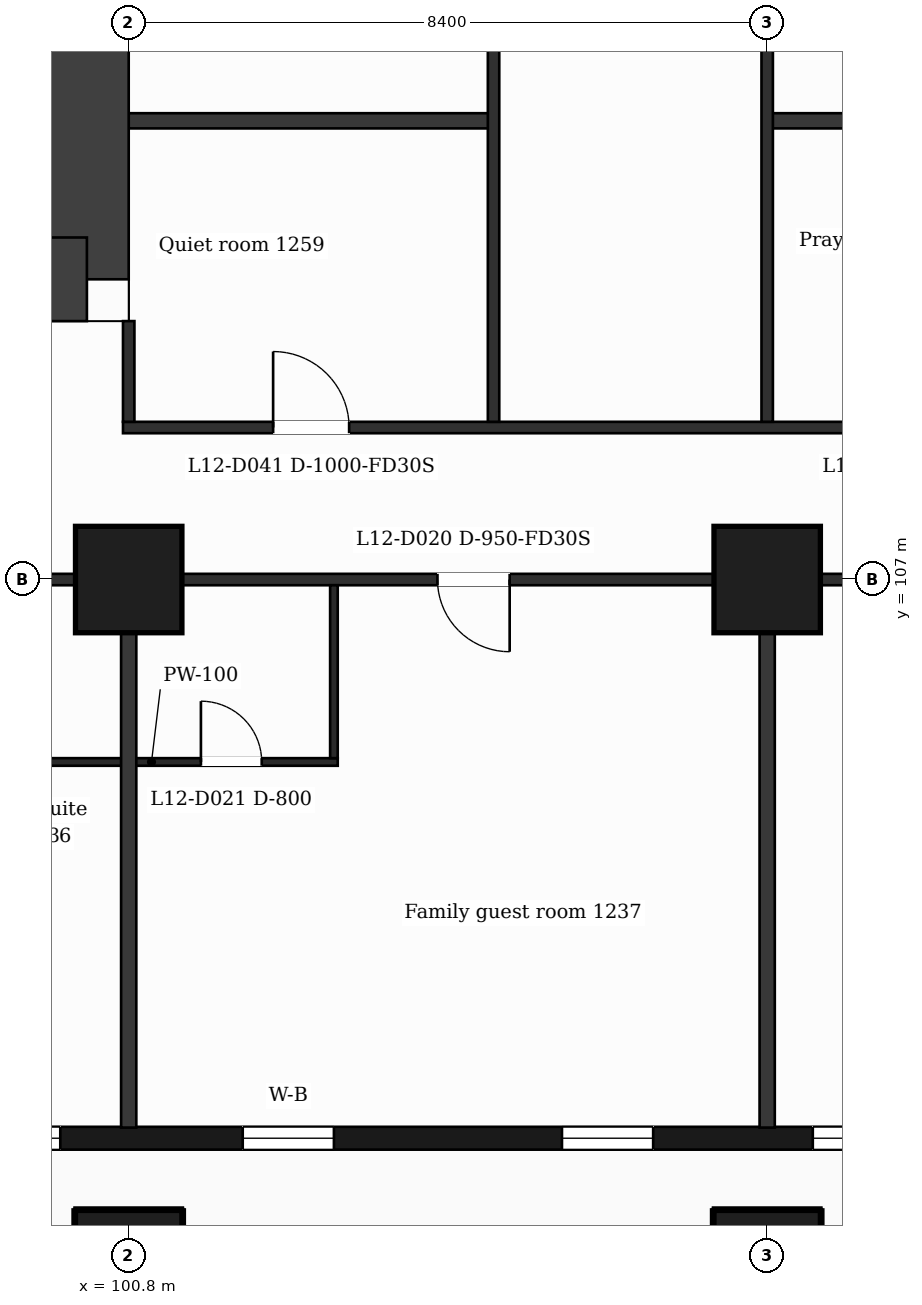
"""IFC4 building model, lengths in metres.
Left out: names, types, materials, properties, quantities, classifications, styles, units other than length and angle.
Written with IfcOpenShell. Run it as: python <this file> out.ifc"""

import sys

from ifc_helpers import new_model, si_unit, direction, frame, frame_2d, origin, origin_2d, place, context, subcontext, project, spatial, rectangle, extrude, element, fill, save


model = new_model("IFC4")
c1 = context("Model", 3, precision=1e-05, world=origin(), true_north=direction((0.0, 1.0)))
c2 = subcontext(c1, "Body", "Model", "MODEL_VIEW")
j1 = project(units=[si_unit("LENGTHUNIT", "METRE"), si_unit("PLANEANGLEUNIT", "RADIAN")], contexts=[c1])
p1 = place(None, origin())
s1 = spatial("IfcSite", under=j1, at=p1, CompositionType="ELEMENT")
p2 = place(p1, origin())
s2 = spatial("IfcBuilding", under=s1, at=p2, CompositionType="ELEMENT")
p3 = place(p2, frame((0.0, 0.0, 60.0)))
s3 = spatial("IfcBuildingStorey", under=s2, at=p3, CompositionType="ELEMENT", Elevation=60.0)
p4 = place(p3, frame((100.25, 131.85, 0.0), z_axis=(0.0, 0.0, 1.0), x_axis=(0.0, -1.0, 0.0)))
e1 = element("IfcWall", 1, at=p4, inside=s3, PredefinedType="SHEAR", context=c2, shape_type="SweptSolid", body=[
    extrude(rectangle(XDim=20.9, YDim=1.1, at=frame_2d((10.45, 0.0))), origin(), (0.0, 0.0, 1.0), 3.5),
])
p5 = place(p4, frame((7.7, 0.0, 0.0)))
e2 = element("IfcOpeningElement", 2, at=p5, cuts=e1, PredefinedType="OPENING", context=c2, shape_type="SweptSolid", body=[
    extrude(rectangle(XDim=1.4, YDim=2.1, at=frame_2d((0.7, 1.05))), frame((0.0, 0.56, 0.0), z_axis=(0.0, -1.0, 0.0), x_axis=(1.0, 0.0, 0.0)), (0.0, 0.0, 1.0), 1.12),
])
p6 = place(p3, frame((100.25, 110.95, 0.0), z_axis=(0.0, 0.0, 1.0), x_axis=(-1.0, 0.0, 0.0)))
e3 = element("IfcWall", 3, at=p6, inside=s3, PredefinedType="SHEAR", context=c2, shape_type="SweptSolid", body=[
    extrude(rectangle(XDim=13.952, YDim=1.1, at=frame_2d((6.976, 0.0))), origin(), (0.0, 0.0, 1.0), 3.5),
])
p7 = place(p6, frame((5.748, 0.0, 0.0)))
e4 = element("IfcOpeningElement", 4, at=p7, cuts=e3, PredefinedType="OPENING", context=c2, shape_type="SweptSolid", body=[
    extrude(rectangle(XDim=1.4, YDim=2.1, at=frame_2d((0.7, 1.05))), frame((0.0, 0.56, 0.0), z_axis=(0.0, -1.0, 0.0), x_axis=(1.0, 0.0, 0.0)), (0.0, 0.0, 1.0), 1.12),
])
for number, where, z_axis, x_axis in (
    (5, (100.8, 98.0, 0.0), (0.0, 0.0, 1.0), (1.0, 0.0, 0.0)),
    (6, (109.2, 98.0, 0.0), (0.0, 0.0, 1.0), (1.0, 0.0, 0.0)),
    (7, (100.8, 107.0, 0.0), (0.0, 0.0, 1.0), (1.0, 0.0, 0.0)),
    (8, (109.2, 107.0, 0.0), (0.0, 0.0, 1.0), (1.0, 0.0, 0.0)),
):
    element("IfcColumn", number, at=place(p3, frame(where, z_axis=z_axis, x_axis=x_axis)), inside=s3, PredefinedType="COLUMN", context=c2, shape_type="SweptSolid", body=[
        extrude(rectangle(XDim=1.4, YDim=1.4, at=origin_2d()), origin(), (0.0, 0.0, 1.0), 3.5),
    ])
p8 = place(p3, frame((89.85, 99.65, 0.0), z_axis=(0.0, 0.0, 1.0), x_axis=(1.0, 0.0, 0.0)))
e9 = element("IfcWall", 9, at=p8, inside=s3, PredefinedType="SOLIDWALL", context=c2, shape_type="SweptSolid", body=[
    extrude(rectangle(XDim=47.25, YDim=0.3, at=frame_2d((23.625, 0.0))), origin(), (0.0, 0.0, 1.0), 3.18),
])
p9 = place(p8, frame((0.725, 0.0, 0.9)))
e10 = element("IfcOpeningElement", 10, at=p9, cuts=e9, PredefinedType="OPENING", context=c2, shape_type="SweptSolid", body=[
    extrude(rectangle(XDim=1.2, YDim=2.1, at=frame_2d((0.6, 1.05))), frame((0.0, 0.16, 0.0), z_axis=(0.0, -1.0, 0.0), x_axis=(1.0, 0.0, 0.0)), (0.0, 0.0, 1.0), 0.32),
])
p10 = place(p8, frame((3.45, 0.0, 0.9)))
e11 = element("IfcOpeningElement", 11, at=p10, cuts=e9, PredefinedType="OPENING", context=c2, shape_type="SweptSolid", body=[
    extrude(rectangle(XDim=2.4, YDim=2.1, at=frame_2d((1.2, 1.05))), frame((0.0, 0.16, 0.0), z_axis=(0.0, -1.0, 0.0), x_axis=(1.0, 0.0, 0.0)), (0.0, 0.0, 1.0), 0.32),
])
p11 = place(p8, frame((7.65, 0.0, 0.9)))
e12 = element("IfcOpeningElement", 12, at=p11, cuts=e9, PredefinedType="OPENING", context=c2, shape_type="SweptSolid", body=[
    extrude(rectangle(XDim=2.4, YDim=2.1, at=frame_2d((1.2, 1.05))), frame((0.0, 0.16, 0.0), z_axis=(0.0, -1.0, 0.0), x_axis=(1.0, 0.0, 0.0)), (0.0, 0.0, 1.0), 0.32),
])
p12 = place(p8, frame((12.45, 0.0, 0.9)))
e13 = element("IfcOpeningElement", 13, at=p12, cuts=e9, PredefinedType="OPENING", context=c2, shape_type="SweptSolid", body=[
    extrude(rectangle(XDim=1.2, YDim=2.1, at=frame_2d((0.6, 1.05))), frame((0.0, 0.16, 0.0), z_axis=(0.0, -1.0, 0.0), x_axis=(1.0, 0.0, 0.0)), (0.0, 0.0, 1.0), 0.32),
])
p13 = place(p8, frame((16.65, 0.0, 0.9)))
e14 = element("IfcOpeningElement", 14, at=p13, cuts=e9, PredefinedType="OPENING", context=c2, shape_type="SweptSolid", body=[
    extrude(rectangle(XDim=1.2, YDim=2.1, at=frame_2d((0.6, 1.05))), frame((0.0, 0.16, 0.0), z_axis=(0.0, -1.0, 0.0), x_axis=(1.0, 0.0, 0.0)), (0.0, 0.0, 1.0), 0.32),
])
p14 = place(p8, frame((19.95, 0.0, 0.9)))
e15 = element("IfcOpeningElement", 15, at=p14, cuts=e9, PredefinedType="OPENING", context=c2, shape_type="SweptSolid", body=[
    extrude(rectangle(XDim=1.2, YDim=2.1, at=frame_2d((0.6, 1.05))), frame((0.0, 0.16, 0.0), z_axis=(0.0, -1.0, 0.0), x_axis=(1.0, 0.0, 0.0)), (0.0, 0.0, 1.0), 0.32),
])
p15 = place(p8, frame((21.75, 0.0, 0.9)))
e16 = element("IfcOpeningElement", 16, at=p15, cuts=e9, PredefinedType="OPENING", context=c2, shape_type="SweptSolid", body=[
    extrude(rectangle(XDim=1.2, YDim=2.1, at=frame_2d((0.6, 1.05))), frame((0.0, 0.16, 0.0), z_axis=(0.0, -1.0, 0.0), x_axis=(1.0, 0.0, 0.0)), (0.0, 0.0, 1.0), 0.32),
])
p16 = place(p8, frame((25.05, 0.0, 0.0)))
e17 = element("IfcOpeningElement", 17, at=p16, cuts=e9, PredefinedType="OPENING", context=c2, shape_type="SweptSolid", body=[
    extrude(rectangle(XDim=1.2, YDim=2.4, at=frame_2d((0.6, 1.2))), frame((0.0, 0.16, 0.0), z_axis=(0.0, -1.0, 0.0), x_axis=(1.0, 0.0, 0.0)), (0.0, 0.0, 1.0), 0.32),
])
p17 = place(p8, frame((28.35, 0.0, 0.9)))
e18 = element("IfcOpeningElement", 18, at=p17, cuts=e9, PredefinedType="OPENING", context=c2, shape_type="SweptSolid", body=[
    extrude(rectangle(XDim=1.2, YDim=2.1, at=frame_2d((0.6, 1.05))), frame((0.0, 0.16, 0.0), z_axis=(0.0, -1.0, 0.0), x_axis=(1.0, 0.0, 0.0)), (0.0, 0.0, 1.0), 0.32),
])
p18 = place(p8, frame((30.15, 0.0, 0.9)))
e19 = element("IfcOpeningElement", 19, at=p18, cuts=e9, PredefinedType="OPENING", context=c2, shape_type="SweptSolid", body=[
    extrude(rectangle(XDim=1.2, YDim=2.1, at=frame_2d((0.6, 1.05))), frame((0.0, 0.16, 0.0), z_axis=(0.0, -1.0, 0.0), x_axis=(1.0, 0.0, 0.0)), (0.0, 0.0, 1.0), 0.32),
])
p19 = place(p8, frame((32.85, 0.0, 0.9)))
e20 = element("IfcOpeningElement", 20, at=p19, cuts=e9, PredefinedType="OPENING", context=c2, shape_type="SweptSolid", body=[
    extrude(rectangle(XDim=2.4, YDim=2.1, at=frame_2d((1.2, 1.05))), frame((0.0, 0.16, 0.0), z_axis=(0.0, -1.0, 0.0), x_axis=(1.0, 0.0, 0.0)), (0.0, 0.0, 1.0), 0.32),
])
p20 = place(p8, frame((37.05, 0.0, 0.9)))
e21 = element("IfcOpeningElement", 21, at=p20, cuts=e9, PredefinedType="OPENING", context=c2, shape_type="SweptSolid", body=[
    extrude(rectangle(XDim=2.4, YDim=2.1, at=frame_2d((1.2, 1.05))), frame((0.0, 0.16, 0.0), z_axis=(0.0, -1.0, 0.0), x_axis=(1.0, 0.0, 0.0)), (0.0, 0.0, 1.0), 0.32),
])
p21 = place(p8, frame((41.85, 0.0, 0.9)))
e22 = element("IfcOpeningElement", 22, at=p21, cuts=e9, PredefinedType="OPENING", context=c2, shape_type="SweptSolid", body=[
    extrude(rectangle(XDim=1.2, YDim=2.1, at=frame_2d((0.6, 1.05))), frame((0.0, 0.16, 0.0), z_axis=(0.0, -1.0, 0.0), x_axis=(1.0, 0.0, 0.0)), (0.0, 0.0, 1.0), 0.32),
])
p22 = place(p8, frame((45.25, 0.0, 0.9)))
e23 = element("IfcOpeningElement", 23, at=p22, cuts=e9, PredefinedType="OPENING", context=c2, shape_type="SweptSolid", body=[
    extrude(rectangle(XDim=1.2, YDim=2.1, at=frame_2d((0.6, 1.05))), frame((0.0, 0.16, 0.0), z_axis=(0.0, -1.0, 0.0), x_axis=(1.0, 0.0, 0.0)), (0.0, 0.0, 1.0), 0.32),
])
p23 = place(p3, frame((98.65, 104.6, 0.0), z_axis=(0.0, 0.0, 1.0), x_axis=(1.0, 0.0, 0.0)))
e24 = element("IfcWall", 24, at=p23, inside=s3, PredefinedType="PARTITIONING", context=c2, shape_type="SweptSolid", body=[
    extrude(rectangle(XDim=4.9, YDim=0.1, at=frame_2d((2.45, 0.0))), origin(), (0.0, 0.0, 1.0), 3.18),
])
p24 = place(p23, frame((3.1, 0.0, 0.0)))
e25 = element("IfcOpeningElement", 25, at=p24, cuts=e24, PredefinedType="OPENING", context=c2, shape_type="SweptSolid", body=[
    extrude(rectangle(XDim=0.8, YDim=2.1, at=frame_2d((0.4, 1.05))), frame((0.0, 0.06, 0.0), z_axis=(0.0, -1.0, 0.0), x_axis=(1.0, 0.0, 0.0)), (0.0, 0.0, 1.0), 0.12),
])
p25 = place(p3, frame((87.018, 107.0, 0.0), z_axis=(0.0, 0.0, 1.0), x_axis=(1.0, 0.0, 0.0)))
e26 = element("IfcWall", 26, at=p25, inside=s3, PredefinedType="PARTITIONING", context=c2, shape_type="SweptSolid", body=[
    extrude(rectangle(XDim=52.765, YDim=0.15, at=frame_2d((26.382, 0.0))), origin(), (0.0, 0.0, 1.0), 3.18),
])
p26 = place(p25, frame((1.032, 0.0, 0.0)))
e27 = element("IfcOpeningElement", 27, at=p26, cuts=e26, PredefinedType="OPENING", context=c2, shape_type="SweptSolid", body=[
    extrude(rectangle(XDim=0.95, YDim=2.1, at=frame_2d((0.475, 1.05))), frame((0.0, 0.085, 0.0), z_axis=(0.0, -1.0, 0.0), x_axis=(1.0, 0.0, 0.0)), (0.0, 0.0, 1.0), 0.17),
])
p27 = place(p25, frame((6.894, 0.0, 0.0)))
e28 = element("IfcOpeningElement", 28, at=p27, cuts=e26, PredefinedType="OPENING", context=c2, shape_type="SweptSolid", body=[
    extrude(rectangle(XDim=0.95, YDim=2.1, at=frame_2d((0.475, 1.05))), frame((0.0, 0.085, 0.0), z_axis=(0.0, -1.0, 0.0), x_axis=(1.0, 0.0, 0.0)), (0.0, 0.0, 1.0), 0.17),
])
p28 = place(p25, frame((17.844, 0.0, 0.0)))
e29 = element("IfcOpeningElement", 29, at=p28, cuts=e26, PredefinedType="OPENING", context=c2, shape_type="SweptSolid", body=[
    extrude(rectangle(XDim=0.95, YDim=2.1, at=frame_2d((0.475, 1.05))), frame((0.0, 0.085, 0.0), z_axis=(0.0, -1.0, 0.0), x_axis=(1.0, 0.0, 0.0)), (0.0, 0.0, 1.0), 0.17),
])
p29 = place(p25, frame((26.245, 0.0, 0.0)))
e30 = element("IfcOpeningElement", 30, at=p29, cuts=e26, PredefinedType="OPENING", context=c2, shape_type="SweptSolid", body=[
    extrude(rectangle(XDim=0.95, YDim=2.1, at=frame_2d((0.475, 1.05))), frame((0.0, 0.085, 0.0), z_axis=(0.0, -1.0, 0.0), x_axis=(1.0, 0.0, 0.0)), (0.0, 0.0, 1.0), 0.17),
])
p30 = place(p25, frame((35.822, 0.0, 0.0)))
e31 = element("IfcOpeningElement", 31, at=p30, cuts=e26, PredefinedType="OPENING", context=c2, shape_type="SweptSolid", body=[
    extrude(rectangle(XDim=0.95, YDim=2.1, at=frame_2d((0.475, 1.05))), frame((0.0, 0.085, 0.0), z_axis=(0.0, -1.0, 0.0), x_axis=(1.0, 0.0, 0.0)), (0.0, 0.0, 1.0), 0.17),
])
p31 = place(p25, frame((42.302, 0.0, 0.0)))
e32 = element("IfcOpeningElement", 32, at=p31, cuts=e26, PredefinedType="OPENING", context=c2, shape_type="SweptSolid", body=[
    extrude(rectangle(XDim=0.95, YDim=2.1, at=frame_2d((0.475, 1.05))), frame((0.0, 0.085, 0.0), z_axis=(0.0, -1.0, 0.0), x_axis=(1.0, 0.0, 0.0)), (0.0, 0.0, 1.0), 0.17),
])
p32 = place(p25, frame((49.285, 0.0, 0.0)))
e33 = element("IfcOpeningElement", 33, at=p32, cuts=e26, PredefinedType="OPENING", context=c2, shape_type="SweptSolid", body=[
    extrude(rectangle(XDim=0.95, YDim=2.1, at=frame_2d((0.475, 1.05))), frame((0.0, 0.085, 0.0), z_axis=(0.0, -1.0, 0.0), x_axis=(1.0, 0.0, 0.0)), (0.0, 0.0, 1.0), 0.17),
])
p33 = place(p3, frame((100.725, 109.0, 0.0), z_axis=(0.0, 0.0, 1.0), x_axis=(1.0, 0.0, 0.0)))
e34 = element("IfcWall", 34, at=p33, inside=s3, PredefinedType="PARTITIONING", context=c2, shape_type="SweptSolid", body=[
    extrude(rectangle(XDim=25.35, YDim=0.15, at=frame_2d((12.675, 0.0))), origin(), (0.0, 0.0, 1.0), 3.18),
])
p34 = place(p33, frame((1.975, 0.0, 0.0)))
e35 = element("IfcOpeningElement", 35, at=p34, cuts=e34, PredefinedType="OPENING", context=c2, shape_type="SweptSolid", body=[
    extrude(rectangle(XDim=1.0, YDim=2.1, at=frame_2d((0.5, 1.05))), frame((0.0, 0.085, 0.0), z_axis=(0.0, -1.0, 0.0), x_axis=(1.0, 0.0, 0.0)), (0.0, 0.0, 1.0), 0.17),
])
p35 = place(p33, frame((10.325, 0.0, 0.0)))
e36 = element("IfcOpeningElement", 36, at=p35, cuts=e34, PredefinedType="OPENING", context=c2, shape_type="SweptSolid", body=[
    extrude(rectangle(XDim=1.0, YDim=2.1, at=frame_2d((0.5, 1.05))), frame((0.0, 0.085, 0.0), z_axis=(0.0, -1.0, 0.0), x_axis=(1.0, 0.0, 0.0)), (0.0, 0.0, 1.0), 0.17),
])
p36 = place(p33, frame((14.9, 0.0, 0.0)))
e37 = element("IfcOpeningElement", 37, at=p36, cuts=e34, PredefinedType="OPENING", context=c2, shape_type="SweptSolid", body=[
    extrude(rectangle(XDim=1.0, YDim=2.1, at=frame_2d((0.5, 1.05))), frame((0.0, 0.085, 0.0), z_axis=(0.0, -1.0, 0.0), x_axis=(1.0, 0.0, 0.0)), (0.0, 0.0, 1.0), 0.17),
])
p37 = place(p33, frame((22.685, 0.0, 0.0)))
e38 = element("IfcOpeningElement", 38, at=p37, cuts=e34, PredefinedType="OPENING", context=c2, shape_type="SweptSolid", body=[
    extrude(rectangle(XDim=1.0, YDim=2.1, at=frame_2d((0.5, 1.05))), frame((0.0, 0.085, 0.0), z_axis=(0.0, -1.0, 0.0), x_axis=(1.0, 0.0, 0.0)), (0.0, 0.0, 1.0), 0.17),
])
p38 = place(p3, frame((100.8, 113.035, 0.0), z_axis=(0.0, 0.0, 1.0), x_axis=(1.0, 0.0, 0.0)))
e39 = element("IfcWall", 39, at=p38, inside=s3, PredefinedType="PARTITIONING", context=c2, shape_type="SweptSolid", body=[
    extrude(rectangle(XDim=4.8, YDim=0.2, at=frame_2d((2.4, 0.0))), origin(), (0.0, 0.0, 1.0), 3.18),
])
p39 = place(p3, frame((109.2, 113.035, 0.0), z_axis=(0.0, 0.0, 1.0), x_axis=(1.0, 0.0, 0.0)))
e40 = element("IfcWall", 40, at=p39, inside=s3, PredefinedType="PARTITIONING", context=c2, shape_type="SweptSolid", body=[
    extrude(rectangle(XDim=4.2, YDim=0.2, at=frame_2d((2.1, 0.0))), origin(), (0.0, 0.0, 1.0), 3.18),
])
p40 = place(p3, frame((100.8, 99.79, 0.0), z_axis=(0.0, 0.0, 1.0), x_axis=(0.0, 1.0, 0.0)))
e41 = element("IfcWall", 41, at=p40, inside=s3, PredefinedType="PARTITIONING", context=c2, shape_type="SweptSolid", body=[
    extrude(rectangle(XDim=7.135, YDim=0.2, at=frame_2d((3.567, 0.0))), origin(), (0.0, 0.0, 1.0), 3.18),
])
p41 = place(p3, frame((100.8, 109.075, 0.0), z_axis=(0.0, 0.0, 1.0), x_axis=(0.0, 1.0, 0.0)))
e42 = element("IfcWall", 42, at=p41, inside=s3, PredefinedType="PARTITIONING", context=c2, shape_type="SweptSolid", body=[
    extrude(rectangle(XDim=1.325, YDim=0.15, at=frame_2d((0.663, 0.0))), origin(), (0.0, 0.0, 1.0), 3.18),
])
p42 = place(p3, frame((103.5, 104.65, 0.0), z_axis=(0.0, 0.0, 1.0), x_axis=(0.0, 1.0, 0.0)))
e43 = element("IfcWall", 43, at=p42, inside=s3, PredefinedType="PARTITIONING", context=c2, shape_type="SweptSolid", body=[
    extrude(rectangle(XDim=2.275, YDim=0.1, at=frame_2d((1.138, 0.0))), origin(), (0.0, 0.0, 1.0), 3.18),
])
p43 = place(p3, frame((105.6, 109.075, 0.0), z_axis=(0.0, 0.0, 1.0), x_axis=(0.0, 1.0, 0.0)))
e44 = element("IfcWall", 44, at=p43, inside=s3, PredefinedType="PARTITIONING", context=c2, shape_type="SweptSolid", body=[
    extrude(rectangle(XDim=13.3, YDim=0.15, at=frame_2d((6.65, 0.0))), origin(), (0.0, 0.0, 1.0), 3.18),
])
p44 = place(p43, frame((8.167, 0.0, 0.0)))
e45 = element("IfcOpeningElement", 45, at=p44, cuts=e44, PredefinedType="OPENING", context=c2, shape_type="SweptSolid", body=[
    extrude(rectangle(XDim=1.0, YDim=2.1, at=frame_2d((0.5, 1.05))), frame((0.0, 0.085, 0.0), z_axis=(0.0, -1.0, 0.0), x_axis=(1.0, 0.0, 0.0)), (0.0, 0.0, 1.0), 0.17),
])
p45 = place(p3, frame((109.2, 99.79, 0.0), z_axis=(0.0, 0.0, 1.0), x_axis=(0.0, 1.0, 0.0)))
e46 = element("IfcWall", 46, at=p45, inside=s3, PredefinedType="PARTITIONING", context=c2, shape_type="SweptSolid", body=[
    extrude(rectangle(XDim=7.135, YDim=0.2, at=frame_2d((3.567, 0.0))), origin(), (0.0, 0.0, 1.0), 3.18),
])
p46 = place(p3, frame((109.2, 109.075, 0.0), z_axis=(0.0, 0.0, 1.0), x_axis=(0.0, 1.0, 0.0)))
e47 = element("IfcWall", 47, at=p46, inside=s3, PredefinedType="PARTITIONING", context=c2, shape_type="SweptSolid", body=[
    extrude(rectangle(XDim=13.3, YDim=0.15, at=frame_2d((6.65, 0.0))), origin(), (0.0, 0.0, 1.0), 3.18),
])
p47 = place(p46, frame((8.939, 0.0, 0.0)))
e48 = element("IfcOpeningElement", 48, at=p47, cuts=e47, PredefinedType="OPENING", context=c2, shape_type="SweptSolid", body=[
    extrude(rectangle(XDim=1.0, YDim=2.1, at=frame_2d((0.5, 1.05))), frame((0.0, 0.085, 0.0), z_axis=(0.0, -1.0, 0.0), x_axis=(1.0, 0.0, 0.0)), (0.0, 0.0, 1.0), 0.17),
])
p48 = place(p11, origin())
e49 = element("IfcWindow", 49, at=p48, inside=s3, PartitioningType="SINGLE_PANEL", PredefinedType="WINDOW", context=c2, shape_type="SweptSolid", body=[
    extrude(rectangle(XDim=2.4, YDim=2.1, at=frame_2d((1.2, 1.05))), frame((0.0, 0.03, 0.0), z_axis=(0.0, -1.0, 0.0), x_axis=(1.0, 0.0, 0.0)), (0.0, 0.0, 1.0), 0.06),
])
fill(e12, e49)
p49 = place(p12, origin())
e50 = element("IfcWindow", 50, at=p49, inside=s3, PartitioningType="SINGLE_PANEL", PredefinedType="WINDOW", context=c2, shape_type="SweptSolid", body=[
    extrude(rectangle(XDim=1.2, YDim=2.1, at=frame_2d((0.6, 1.05))), frame((0.0, 0.03, 0.0), z_axis=(0.0, -1.0, 0.0), x_axis=(1.0, 0.0, 0.0)), (0.0, 0.0, 1.0), 0.06),
])
fill(e13, e50)
p50 = place(p13, origin())
e51 = element("IfcWindow", 51, at=p50, inside=s3, PartitioningType="SINGLE_PANEL", PredefinedType="WINDOW", context=c2, shape_type="SweptSolid", body=[
    extrude(rectangle(XDim=1.2, YDim=2.1, at=frame_2d((0.6, 1.05))), frame((0.0, 0.03, 0.0), z_axis=(0.0, -1.0, 0.0), x_axis=(1.0, 0.0, 0.0)), (0.0, 0.0, 1.0), 0.06),
])
fill(e14, e51)
p51 = place(p14, origin())
e52 = element("IfcWindow", 52, at=p51, inside=s3, PartitioningType="SINGLE_PANEL", PredefinedType="WINDOW", context=c2, shape_type="SweptSolid", body=[
    extrude(rectangle(XDim=1.2, YDim=2.1, at=frame_2d((0.6, 1.05))), frame((0.0, 0.03, 0.0), z_axis=(0.0, -1.0, 0.0), x_axis=(1.0, 0.0, 0.0)), (0.0, 0.0, 1.0), 0.06),
])
fill(e15, e52)
p52 = place(p28, origin())
e53 = element("IfcDoor", 53, at=p52, inside=s3, OperationType="SINGLE_SWING_RIGHT", PredefinedType="DOOR", context=c2, shape_type="SweptSolid", body=[
    extrude(rectangle(XDim=0.95, YDim=2.1, at=frame_2d((0.475, 1.05))), frame((0.0, 0.025, 0.0), z_axis=(0.0, -1.0, 0.0), x_axis=(1.0, 0.0, 0.0)), (0.0, 0.0, 1.0), 0.05),
])
fill(e29, e53)
p53 = place(p24, origin())
e54 = element("IfcDoor", 54, at=p53, inside=s3, OperationType="SINGLE_SWING_LEFT", PredefinedType="DOOR", context=c2, shape_type="SweptSolid", body=[
    extrude(rectangle(XDim=0.8, YDim=2.1, at=frame_2d((0.4, 1.05))), frame((0.0, 0.025, 0.0), z_axis=(0.0, -1.0, 0.0), x_axis=(1.0, 0.0, 0.0)), (0.0, 0.0, 1.0), 0.05),
])
fill(e25, e54)
p54 = place(p34, origin())
e55 = element("IfcDoor", 55, at=p54, inside=s3, OperationType="SINGLE_SWING_LEFT", PredefinedType="DOOR", context=c2, shape_type="SweptSolid", body=[
    extrude(rectangle(XDim=1.0, YDim=2.1, at=frame_2d((0.5, 1.05))), frame((0.0, 0.025, 0.0), z_axis=(0.0, -1.0, 0.0), x_axis=(1.0, 0.0, 0.0)), (0.0, 0.0, 1.0), 0.05),
])
fill(e35, e55)
save(model, sys.argv[1])
